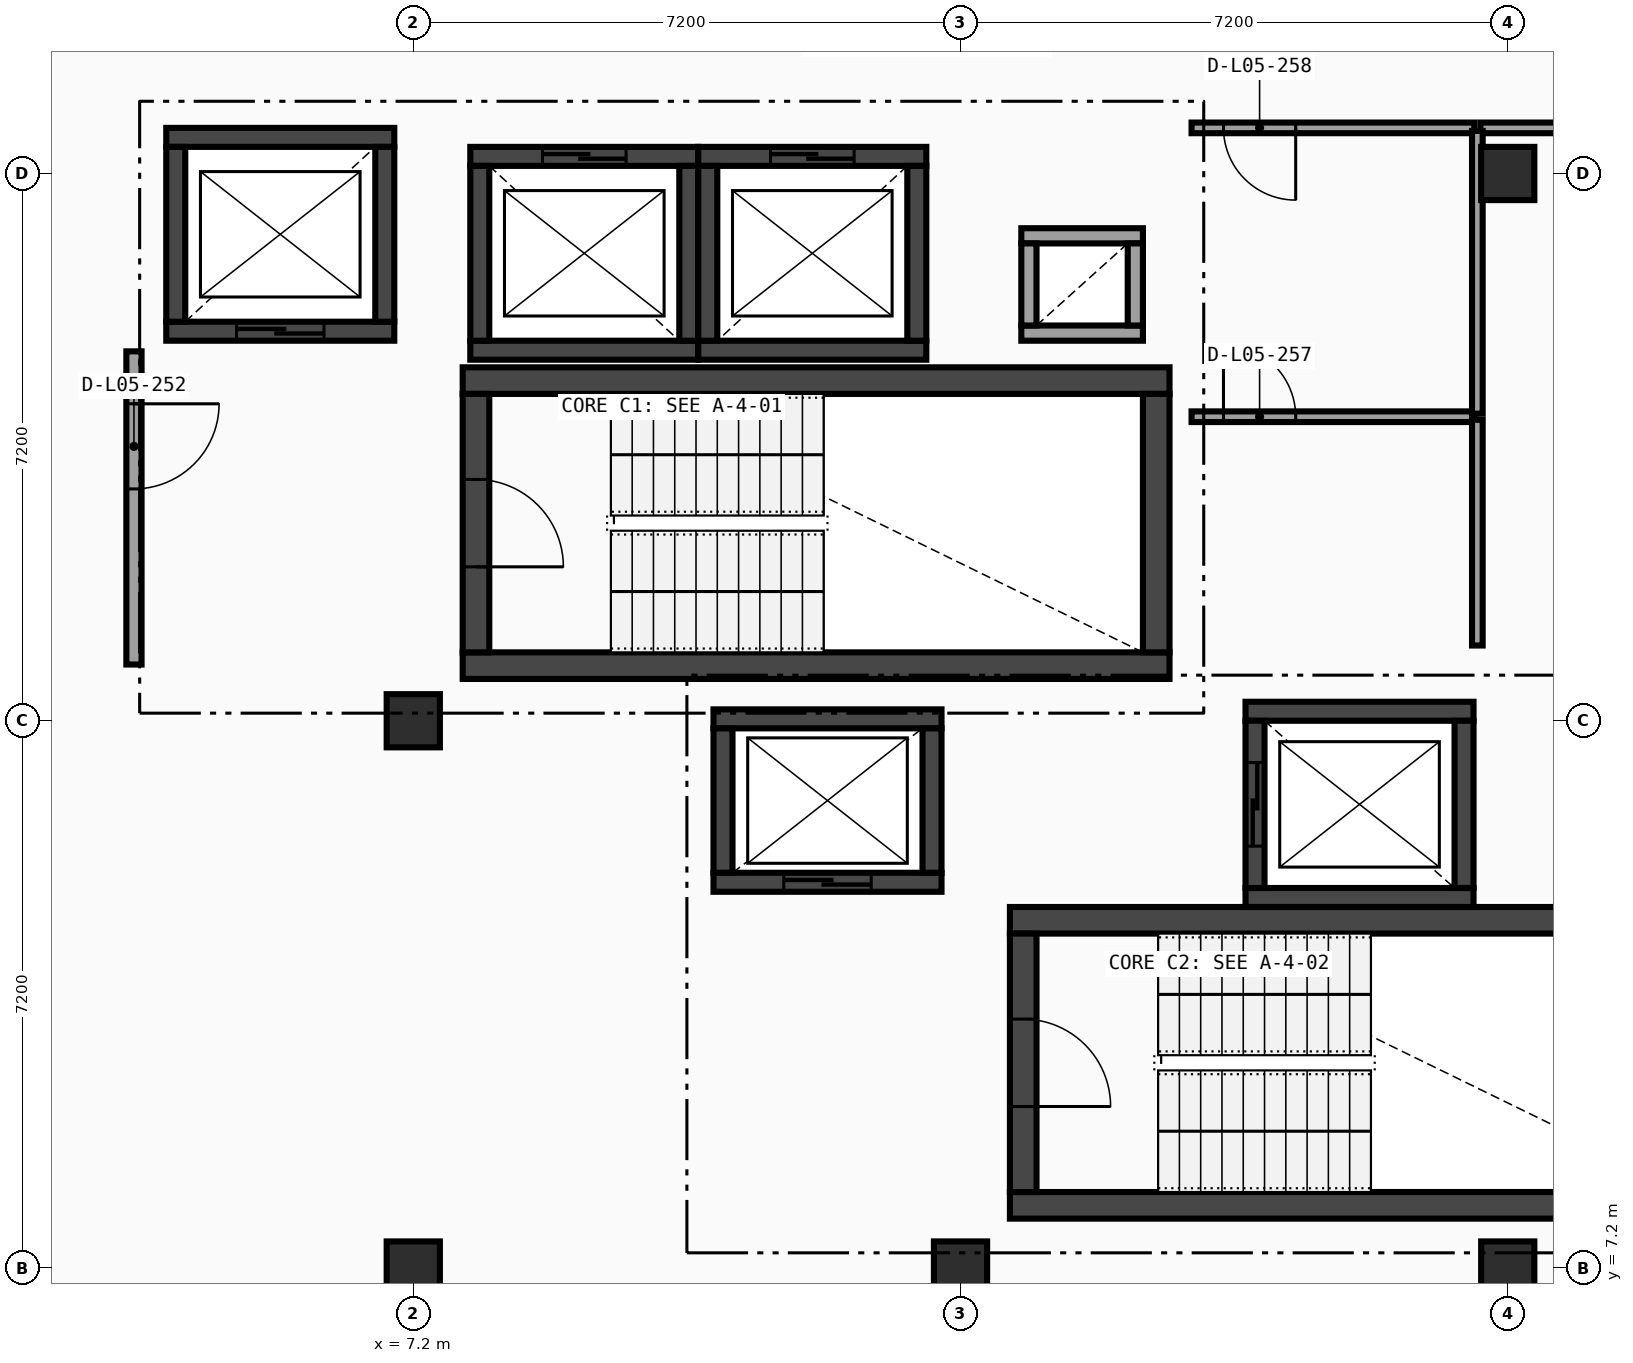
"""IFC4 building model, lengths in metres.
Left out: names, types, materials, properties, quantities, classifications, styles, units other than length and angle.
Written with IfcOpenShell. Run it as: python <this file> out.ifc"""

import sys

from ifc_helpers import new_model, si_unit, direction, frame, frame_2d, origin, origin_2d, place, context, subcontext, project, spatial, rectangle, extrude, element, fill, save


model = new_model("IFC4")
c1 = context("Model", 3, precision=1e-05, world=origin(), true_north=direction((0.0, 1.0)))
c2 = subcontext(c1, "Body", "Model", "MODEL_VIEW")
j1 = project(units=[si_unit("LENGTHUNIT", "METRE"), si_unit("PLANEANGLEUNIT", "RADIAN")], contexts=[c1])
p1 = place(None, origin())
s1 = spatial("IfcSite", under=j1, at=p1, CompositionType="ELEMENT")
p2 = place(p1, origin())
s2 = spatial("IfcBuilding", under=s1, at=p2, CompositionType="ELEMENT")
p3 = place(p2, frame((0.0, 0.0, 22.95)))
s3 = spatial("IfcBuildingStorey", under=s2, at=p3, CompositionType="ELEMENT", Elevation=22.95)
for number, where, z_axis, x_axis in (
    (1, (7.2, 7.2, 0.0), (0.0, 0.0, 1.0), (1.0, 0.0, 0.0)),
    (2, (7.2, 14.4, 0.0), (0.0, 0.0, 1.0), (1.0, 0.0, 0.0)),
    (3, (14.4, 7.2, 0.0), (0.0, 0.0, 1.0), (1.0, 0.0, 0.0)),
    (4, (21.6, 7.2, 0.0), (0.0, 0.0, 1.0), (1.0, 0.0, 0.0)),
    (5, (21.6, 21.6, 0.0), (0.0, 0.0, 1.0), (1.0, 0.0, 0.0)),
):
    element("IfcColumn", number, at=place(p3, frame(where, z_axis=z_axis, x_axis=x_axis)), inside=s3, PredefinedType="COLUMN", context=c2, shape_type="SweptSolid", body=[
        extrude(rectangle(XDim=0.7, YDim=0.7, at=origin_2d()), origin(), (0.0, 0.0, 1.0), 4.05),
    ])
for number, where, z_axis, x_axis in (
    (6, (7.85, 15.125, 0.0), (0.0, 0.0, 1.0), (1.0, 0.0, 0.0)),
    (7, (17.15, 18.875, 0.0), (0.0, 0.0, 1.0), (-1.0, 0.0, 0.0)),
):
    element("IfcWall", number, at=place(p3, frame(where, z_axis=z_axis, x_axis=x_axis)), inside=s3, PredefinedType="SHEAR", context=c2, shape_type="SweptSolid", body=[
        extrude(rectangle(XDim=9.3, YDim=0.35, at=frame_2d((4.65, 0.0))), origin(), (0.0, 0.0, 1.0), 3.8),
    ])
p4 = place(p3, frame((8.025, 18.7, 0.0), z_axis=(0.0, 0.0, 1.0), x_axis=(0.0, -1.0, 0.0)))
e8 = element("IfcWall", 8, at=p4, inside=s3, PredefinedType="SHEAR", context=c2, shape_type="SweptSolid", body=[
    extrude(rectangle(XDim=3.4, YDim=0.35, at=frame_2d((1.7, 0.0))), origin(), (0.0, 0.0, 1.0), 3.8),
])
p5 = place(p4, frame((1.125, 0.0, 0.0)))
e9 = element("IfcOpeningElement", 9, at=p5, cuts=e8, PredefinedType="OPENING", context=c2, shape_type="SweptSolid", body=[
    extrude(rectangle(XDim=1.15, YDim=2.1, at=frame_2d((0.575, 1.05))), frame((0.0, 0.185, 0.0), z_axis=(0.0, -1.0, 0.0), x_axis=(1.0, 0.0, 0.0)), (0.0, 0.0, 1.0), 0.37),
])
p6 = place(p3, frame((16.975, 15.3, 0.0), z_axis=(0.0, 0.0, 1.0), x_axis=(0.0, 1.0, 0.0)))
e10 = element("IfcWall", 10, at=p6, inside=s3, PredefinedType="SHEAR", context=c2, shape_type="SweptSolid", body=[
    extrude(rectangle(XDim=3.4, YDim=0.35, at=frame_2d((1.7, 0.0))), origin(), (0.0, 0.0, 1.0), 3.8),
])
p7 = place(p3, frame((3.95, 19.525, 0.0), z_axis=(0.0, 0.0, 1.0), x_axis=(1.0, 0.0, 0.0)))
e11 = element("IfcWall", 11, at=p7, inside=s3, PredefinedType="SHEAR", context=c2, shape_type="SweptSolid", body=[
    extrude(rectangle(XDim=3.0, YDim=0.25, at=frame_2d((1.5, 0.0))), origin(), (0.0, 0.0, 1.0), 3.8),
])
p8 = place(p7, frame((0.925, 0.0, 0.0)))
e12 = element("IfcOpeningElement", 12, at=p8, cuts=e11, PredefinedType="OPENING", context=c2, shape_type="SweptSolid", body=[
    extrude(rectangle(XDim=1.15, YDim=2.1, at=frame_2d((0.575, 1.05))), frame((0.0, 0.135, 0.0), z_axis=(0.0, -1.0, 0.0), x_axis=(1.0, 0.0, 0.0)), (0.0, 0.0, 1.0), 0.27),
])
p9 = place(p3, frame((6.95, 22.075, 0.0), z_axis=(0.0, 0.0, 1.0), x_axis=(-1.0, 0.0, 0.0)))
e13 = element("IfcWall", 13, at=p9, inside=s3, PredefinedType="SHEAR", context=c2, shape_type="SweptSolid", body=[
    extrude(rectangle(XDim=3.0, YDim=0.25, at=frame_2d((1.5, 0.0))), origin(), (0.0, 0.0, 1.0), 3.8),
])
for number, where, z_axis, x_axis in (
    (14, (4.075, 21.95, 0.0), (0.0, 0.0, 1.0), (0.0, -1.0, 0.0)),
    (15, (6.825, 19.65, 0.0), (0.0, 0.0, 1.0), (0.0, 1.0, 0.0)),
):
    element("IfcWall", number, at=place(p3, frame(where, z_axis=z_axis, x_axis=x_axis)), inside=s3, PredefinedType="SHEAR", context=c2, shape_type="SweptSolid", body=[
        extrude(rectangle(XDim=2.3, YDim=0.25, at=frame_2d((1.15, 0.0))), origin(), (0.0, 0.0, 1.0), 3.8),
    ])
p10 = place(p3, frame((7.95, 19.275, 0.0), z_axis=(0.0, 0.0, 1.0), x_axis=(1.0, 0.0, 0.0)))
e16 = element("IfcWall", 16, at=p10, inside=s3, PredefinedType="SHEAR", context=c2, shape_type="SweptSolid", body=[
    extrude(rectangle(XDim=3.0, YDim=0.25, at=frame_2d((1.5, 0.0))), origin(), (0.0, 0.0, 1.0), 3.8),
])
p11 = place(p3, frame((10.95, 21.825, 0.0), z_axis=(0.0, 0.0, 1.0), x_axis=(-1.0, 0.0, 0.0)))
e17 = element("IfcWall", 17, at=p11, inside=s3, PredefinedType="SHEAR", context=c2, shape_type="SweptSolid", body=[
    extrude(rectangle(XDim=3.0, YDim=0.25, at=frame_2d((1.5, 0.0))), origin(), (0.0, 0.0, 1.0), 3.8),
])
p12 = place(p11, frame((0.95, 0.0, 0.0)))
e18 = element("IfcOpeningElement", 18, at=p12, cuts=e17, PredefinedType="OPENING", context=c2, shape_type="SweptSolid", body=[
    extrude(rectangle(XDim=1.1, YDim=2.1, at=frame_2d((0.55, 1.05))), frame((0.0, 0.135, 0.0), z_axis=(0.0, -1.0, 0.0), x_axis=(1.0, 0.0, 0.0)), (0.0, 0.0, 1.0), 0.27),
])
for number, where, z_axis, x_axis in (
    (19, (8.075, 21.7, 0.0), (0.0, 0.0, 1.0), (0.0, -1.0, 0.0)),
    (20, (10.825, 19.4, 0.0), (0.0, 0.0, 1.0), (0.0, 1.0, 0.0)),
):
    element("IfcWall", number, at=place(p3, frame(where, z_axis=z_axis, x_axis=x_axis)), inside=s3, PredefinedType="SHEAR", context=c2, shape_type="SweptSolid", body=[
        extrude(rectangle(XDim=2.3, YDim=0.25, at=frame_2d((1.15, 0.0))), origin(), (0.0, 0.0, 1.0), 3.8),
    ])
p13 = place(p3, frame((10.95, 19.275, 0.0), z_axis=(0.0, 0.0, 1.0), x_axis=(1.0, 0.0, 0.0)))
e21 = element("IfcWall", 21, at=p13, inside=s3, PredefinedType="SHEAR", context=c2, shape_type="SweptSolid", body=[
    extrude(rectangle(XDim=3.0, YDim=0.25, at=frame_2d((1.5, 0.0))), origin(), (0.0, 0.0, 1.0), 3.8),
])
p14 = place(p3, frame((13.95, 21.825, 0.0), z_axis=(0.0, 0.0, 1.0), x_axis=(-1.0, 0.0, 0.0)))
e22 = element("IfcWall", 22, at=p14, inside=s3, PredefinedType="SHEAR", context=c2, shape_type="SweptSolid", body=[
    extrude(rectangle(XDim=3.0, YDim=0.25, at=frame_2d((1.5, 0.0))), origin(), (0.0, 0.0, 1.0), 3.8),
])
p15 = place(p14, frame((0.95, 0.0, 0.0)))
e23 = element("IfcOpeningElement", 23, at=p15, cuts=e22, PredefinedType="OPENING", context=c2, shape_type="SweptSolid", body=[
    extrude(rectangle(XDim=1.1, YDim=2.1, at=frame_2d((0.55, 1.05))), frame((0.0, 0.135, 0.0), z_axis=(0.0, -1.0, 0.0), x_axis=(1.0, 0.0, 0.0)), (0.0, 0.0, 1.0), 0.27),
])
for number, where, z_axis, x_axis in (
    (24, (11.075, 21.7, 0.0), (0.0, 0.0, 1.0), (0.0, -1.0, 0.0)),
    (25, (13.825, 19.4, 0.0), (0.0, 0.0, 1.0), (0.0, 1.0, 0.0)),
):
    element("IfcWall", number, at=place(p3, frame(where, z_axis=z_axis, x_axis=x_axis)), inside=s3, PredefinedType="SHEAR", context=c2, shape_type="SweptSolid", body=[
        extrude(rectangle(XDim=2.3, YDim=0.25, at=frame_2d((1.15, 0.0))), origin(), (0.0, 0.0, 1.0), 3.8),
    ])
for number, where, z_axis, x_axis in (
    (26, (15.05, 8.025, 0.0), (0.0, 0.0, 1.0), (1.0, 0.0, 0.0)),
    (27, (24.35, 11.775, 0.0), (0.0, 0.0, 1.0), (-1.0, 0.0, 0.0)),
):
    element("IfcWall", number, at=place(p3, frame(where, z_axis=z_axis, x_axis=x_axis)), inside=s3, PredefinedType="SHEAR", context=c2, shape_type="SweptSolid", body=[
        extrude(rectangle(XDim=9.3, YDim=0.35, at=frame_2d((4.65, 0.0))), origin(), (0.0, 0.0, 1.0), 3.8),
    ])
p16 = place(p3, frame((15.225, 11.6, 0.0), z_axis=(0.0, 0.0, 1.0), x_axis=(0.0, -1.0, 0.0)))
e28 = element("IfcWall", 28, at=p16, inside=s3, PredefinedType="SHEAR", context=c2, shape_type="SweptSolid", body=[
    extrude(rectangle(XDim=3.4, YDim=0.35, at=frame_2d((1.7, 0.0))), origin(), (0.0, 0.0, 1.0), 3.8),
])
p17 = place(p16, frame((1.125, 0.0, 0.0)))
e29 = element("IfcOpeningElement", 29, at=p17, cuts=e28, PredefinedType="OPENING", context=c2, shape_type="SweptSolid", body=[
    extrude(rectangle(XDim=1.15, YDim=2.1, at=frame_2d((0.575, 1.05))), frame((0.0, 0.185, 0.0), z_axis=(0.0, -1.0, 0.0), x_axis=(1.0, 0.0, 0.0)), (0.0, 0.0, 1.0), 0.37),
])
p18 = place(p3, frame((11.15, 12.275, 0.0), z_axis=(0.0, 0.0, 1.0), x_axis=(1.0, 0.0, 0.0)))
e30 = element("IfcWall", 30, at=p18, inside=s3, PredefinedType="SHEAR", context=c2, shape_type="SweptSolid", body=[
    extrude(rectangle(XDim=3.0, YDim=0.25, at=frame_2d((1.5, 0.0))), origin(), (0.0, 0.0, 1.0), 3.8),
])
p19 = place(p18, frame((0.925, 0.0, 0.0)))
e31 = element("IfcOpeningElement", 31, at=p19, cuts=e30, PredefinedType="OPENING", context=c2, shape_type="SweptSolid", body=[
    extrude(rectangle(XDim=1.15, YDim=2.1, at=frame_2d((0.575, 1.05))), frame((0.0, 0.135, 0.0), z_axis=(0.0, -1.0, 0.0), x_axis=(1.0, 0.0, 0.0)), (0.0, 0.0, 1.0), 0.27),
])
p20 = place(p3, frame((14.15, 14.425, 0.0), z_axis=(0.0, 0.0, 1.0), x_axis=(-1.0, 0.0, 0.0)))
e32 = element("IfcWall", 32, at=p20, inside=s3, PredefinedType="SHEAR", context=c2, shape_type="SweptSolid", body=[
    extrude(rectangle(XDim=3.0, YDim=0.25, at=frame_2d((1.5, 0.0))), origin(), (0.0, 0.0, 1.0), 3.8),
])
for number, where, z_axis, x_axis in (
    (33, (11.275, 14.3, 0.0), (0.0, 0.0, 1.0), (0.0, -1.0, 0.0)),
    (34, (14.025, 12.4, 0.0), (0.0, 0.0, 1.0), (0.0, 1.0, 0.0)),
):
    element("IfcWall", number, at=place(p3, frame(where, z_axis=z_axis, x_axis=x_axis)), inside=s3, PredefinedType="SHEAR", context=c2, shape_type="SweptSolid", body=[
        extrude(rectangle(XDim=1.9, YDim=0.25, at=frame_2d((0.95, 0.0))), origin(), (0.0, 0.0, 1.0), 3.8),
    ])
for number, where, z_axis, x_axis in (
    (35, (18.15, 12.075, 0.0), (0.0, 0.0, 1.0), (1.0, 0.0, 0.0)),
    (36, (21.15, 14.525, 0.0), (0.0, 0.0, 1.0), (-1.0, 0.0, 0.0)),
):
    element("IfcWall", number, at=place(p3, frame(where, z_axis=z_axis, x_axis=x_axis)), inside=s3, PredefinedType="SHEAR", context=c2, shape_type="SweptSolid", body=[
        extrude(rectangle(XDim=3.0, YDim=0.25, at=frame_2d((1.5, 0.0))), origin(), (0.0, 0.0, 1.0), 3.8),
    ])
p21 = place(p3, frame((18.275, 14.4, 0.0), z_axis=(0.0, 0.0, 1.0), x_axis=(0.0, -1.0, 0.0)))
e37 = element("IfcWall", 37, at=p21, inside=s3, PredefinedType="SHEAR", context=c2, shape_type="SweptSolid", body=[
    extrude(rectangle(XDim=2.2, YDim=0.25, at=frame_2d((1.1, 0.0))), origin(), (0.0, 0.0, 1.0), 3.8),
])
p22 = place(p21, frame((0.55, 0.0, 0.0)))
e38 = element("IfcOpeningElement", 38, at=p22, cuts=e37, PredefinedType="OPENING", context=c2, shape_type="SweptSolid", body=[
    extrude(rectangle(XDim=1.1, YDim=2.1, at=frame_2d((0.55, 1.05))), frame((0.0, 0.135, 0.0), z_axis=(0.0, -1.0, 0.0), x_axis=(1.0, 0.0, 0.0)), (0.0, 0.0, 1.0), 0.27),
])
p23 = place(p3, frame((21.025, 12.2, 0.0), z_axis=(0.0, 0.0, 1.0), x_axis=(0.0, 1.0, 0.0)))
e39 = element("IfcWall", 39, at=p23, inside=s3, PredefinedType="SHEAR", context=c2, shape_type="SweptSolid", body=[
    extrude(rectangle(XDim=2.2, YDim=0.25, at=frame_2d((1.1, 0.0))), origin(), (0.0, 0.0, 1.0), 3.8),
])
for number, where, z_axis, x_axis in (
    (40, (15.2, 19.5, 0.0), (0.0, 0.0, 1.0), (1.0, 0.0, 0.0)),
    (41, (16.8, 20.78, 0.0), (0.0, 0.0, 1.0), (-1.0, 0.0, 0.0)),
):
    element("IfcWall", number, at=place(p3, frame(where, z_axis=z_axis, x_axis=x_axis)), inside=s3, PredefinedType="SOLIDWALL", context=c2, shape_type="SweptSolid", body=[
        extrude(rectangle(XDim=1.6, YDim=0.2, at=frame_2d((0.8, 0.0))), origin(), (0.0, 0.0, 1.0), 3.8),
    ])
for number, where, z_axis, x_axis in (
    (42, (15.3, 20.68, 0.0), (0.0, 0.0, 1.0), (0.0, -1.0, 0.0)),
    (43, (16.7, 19.6, 0.0), (0.0, 0.0, 1.0), (0.0, 1.0, 0.0)),
):
    element("IfcWall", number, at=place(p3, frame(where, z_axis=z_axis, x_axis=x_axis)), inside=s3, PredefinedType="SOLIDWALL", context=c2, shape_type="SweptSolid", body=[
        extrude(rectangle(XDim=1.08, YDim=0.2, at=frame_2d((0.54, 0.0))), origin(), (0.0, 0.0, 1.0), 3.8),
    ])
p24 = place(p3, frame((3.525, 15.14, 0.0), z_axis=(0.0, 0.0, 1.0), x_axis=(0.0, 1.0, 0.0)))
e44 = element("IfcWall", 44, at=p24, inside=s3, PredefinedType="PARTITIONING", context=c2, shape_type="SweptSolid", body=[
    extrude(rectangle(XDim=4.12, YDim=0.2, at=frame_2d((2.06, 0.0))), origin(), (0.0, 0.0, 1.0), 3.8),
])
p25 = place(p24, frame((2.31, 0.0, 0.0)))
e45 = element("IfcOpeningElement", 45, at=p25, cuts=e44, PredefinedType="OPENING", context=c2, shape_type="SweptSolid", body=[
    extrude(rectangle(XDim=1.12, YDim=2.1, at=frame_2d((0.56, 1.05))), frame((0.0, 0.11, 0.0), z_axis=(0.0, -1.0, 0.0), x_axis=(1.0, 0.0, 0.0)), (0.0, 0.0, 1.0), 0.22),
])
p26 = place(p3, frame((17.44, 22.2, 0.0), z_axis=(0.0, 0.0, 1.0), x_axis=(1.0, 0.0, 0.0)))
e46 = element("IfcWall", 46, at=p26, inside=s3, PredefinedType="PARTITIONING", context=c2, shape_type="SweptSolid", body=[
    extrude(rectangle(XDim=3.72, YDim=0.14, at=frame_2d((1.86, 0.0))), origin(), (0.0, 0.0, 1.0), 3.8),
])
p27 = place(p26, frame((0.42, 0.0, 0.0)))
e47 = element("IfcOpeningElement", 47, at=p27, cuts=e46, PredefinedType="OPENING", context=c2, shape_type="SweptSolid", body=[
    extrude(rectangle(XDim=0.95, YDim=2.08, at=frame_2d((0.475, 1.04))), frame((0.0, 0.08, 0.0), z_axis=(0.0, -1.0, 0.0), x_axis=(1.0, 0.0, 0.0)), (0.0, 0.0, 1.0), 0.16),
])
p28 = place(p3, frame((21.24, 22.2, 0.0), z_axis=(0.0, 0.0, 1.0), x_axis=(1.0, 0.0, 0.0)))
e48 = element("IfcWall", 48, at=p28, inside=s3, PredefinedType="PARTITIONING", context=c2, shape_type="SweptSolid", body=[
    extrude(rectangle(XDim=3.12, YDim=0.14, at=frame_2d((1.56, 0.0))), origin(), (0.0, 0.0, 1.0), 3.206),
])
p29 = place(p28, frame((1.75, 0.0, 0.0)))
e49 = element("IfcOpeningElement", 49, at=p29, cuts=e48, PredefinedType="OPENING", context=c2, shape_type="SweptSolid", body=[
    extrude(rectangle(XDim=0.95, YDim=2.08, at=frame_2d((0.475, 1.04))), frame((0.0, 0.08, 0.0), z_axis=(0.0, -1.0, 0.0), x_axis=(1.0, 0.0, 0.0)), (0.0, 0.0, 1.0), 0.16),
])
p30 = place(p3, frame((17.44, 18.4, 0.0), z_axis=(0.0, 0.0, 1.0), x_axis=(1.0, 0.0, 0.0)))
e50 = element("IfcWall", 50, at=p30, inside=s3, PredefinedType="PARTITIONING", context=c2, shape_type="SweptSolid", body=[
    extrude(rectangle(XDim=3.72, YDim=0.14, at=frame_2d((1.86, 0.0))), origin(), (0.0, 0.0, 1.0), 3.8),
])
p31 = place(p30, frame((0.42, 0.0, 0.0)))
e51 = element("IfcOpeningElement", 51, at=p31, cuts=e50, PredefinedType="OPENING", context=c2, shape_type="SweptSolid", body=[
    extrude(rectangle(XDim=0.95, YDim=2.08, at=frame_2d((0.475, 1.04))), frame((0.0, 0.08, 0.0), z_axis=(0.0, -1.0, 0.0), x_axis=(1.0, 0.0, 0.0)), (0.0, 0.0, 1.0), 0.16),
])
p32 = place(p3, frame((21.2, 15.39, 0.0), z_axis=(0.0, 0.0, 1.0), x_axis=(0.0, 1.0, 0.0)))
e52 = element("IfcWall", 52, at=p32, inside=s3, PredefinedType="PARTITIONING", context=c2, shape_type="SweptSolid", body=[
    extrude(rectangle(XDim=2.97, YDim=0.14, at=frame_2d((1.485, 0.0))), origin(), (0.0, 0.0, 1.0), 3.8),
])
p33 = place(p3, frame((21.2, 18.44, 0.0), z_axis=(0.0, 0.0, 1.0), x_axis=(0.0, 1.0, 0.0)))
e53 = element("IfcWall", 53, at=p33, inside=s3, PredefinedType="PARTITIONING", context=c2, shape_type="SweptSolid", body=[
    extrude(rectangle(XDim=3.72, YDim=0.14, at=frame_2d((1.86, 0.0))), origin(), (0.0, 0.0, 1.0), 3.8),
])
p34 = place(p5, frame((1.15, 0.0, 0.0), z_axis=(0.0, 0.0, 1.0), x_axis=(-1.0, 0.0, 0.0)))
e54 = element("IfcDoor", 54, at=p34, inside=s3, OperationType="SINGLE_SWING_LEFT", PredefinedType="DOOR", context=c2, shape_type="SweptSolid", body=[
    extrude(rectangle(XDim=1.15, YDim=2.1, at=frame_2d((0.575, 1.05))), frame((0.0, 0.025, 0.0), z_axis=(0.0, -1.0, 0.0), x_axis=(1.0, 0.0, 0.0)), (0.0, 0.0, 1.0), 0.05),
])
fill(e9, e54)
p35 = place(p8, origin())
e55 = element("IfcDoor", 55, at=p35, inside=s3, OperationType="SLIDING_TO_RIGHT", PredefinedType="DOOR", context=c2, shape_type="SweptSolid", body=[
    extrude(rectangle(XDim=1.15, YDim=2.1, at=frame_2d((0.575, 1.05))), frame((0.0, 0.025, 0.0), z_axis=(0.0, -1.0, 0.0), x_axis=(1.0, 0.0, 0.0)), (0.0, 0.0, 1.0), 0.05),
])
fill(e12, e55)
p36 = place(p12, origin())
e56 = element("IfcDoor", 56, at=p36, inside=s3, OperationType="SLIDING_TO_LEFT", PredefinedType="DOOR", context=c2, shape_type="SweptSolid", body=[
    extrude(rectangle(XDim=1.1, YDim=2.1, at=frame_2d((0.55, 1.05))), frame((0.0, 0.025, 0.0), z_axis=(0.0, -1.0, 0.0), x_axis=(1.0, 0.0, 0.0)), (0.0, 0.0, 1.0), 0.05),
])
fill(e18, e56)
p37 = place(p15, origin())
e57 = element("IfcDoor", 57, at=p37, inside=s3, OperationType="SLIDING_TO_LEFT", PredefinedType="DOOR", context=c2, shape_type="SweptSolid", body=[
    extrude(rectangle(XDim=1.1, YDim=2.1, at=frame_2d((0.55, 1.05))), frame((0.0, 0.025, 0.0), z_axis=(0.0, -1.0, 0.0), x_axis=(1.0, 0.0, 0.0)), (0.0, 0.0, 1.0), 0.05),
])
fill(e23, e57)
p38 = place(p17, frame((1.15, 0.0, 0.0), z_axis=(0.0, 0.0, 1.0), x_axis=(-1.0, 0.0, 0.0)))
e58 = element("IfcDoor", 58, at=p38, inside=s3, OperationType="SINGLE_SWING_LEFT", PredefinedType="DOOR", context=c2, shape_type="SweptSolid", body=[
    extrude(rectangle(XDim=1.15, YDim=2.1, at=frame_2d((0.575, 1.05))), frame((0.0, 0.025, 0.0), z_axis=(0.0, -1.0, 0.0), x_axis=(1.0, 0.0, 0.0)), (0.0, 0.0, 1.0), 0.05),
])
fill(e29, e58)
p39 = place(p19, origin())
e59 = element("IfcDoor", 59, at=p39, inside=s3, OperationType="SLIDING_TO_RIGHT", PredefinedType="DOOR", context=c2, shape_type="SweptSolid", body=[
    extrude(rectangle(XDim=1.15, YDim=2.1, at=frame_2d((0.575, 1.05))), frame((0.0, 0.025, 0.0), z_axis=(0.0, -1.0, 0.0), x_axis=(1.0, 0.0, 0.0)), (0.0, 0.0, 1.0), 0.05),
])
fill(e31, e59)
p40 = place(p22, origin())
e60 = element("IfcDoor", 60, at=p40, inside=s3, OperationType="SLIDING_TO_LEFT", PredefinedType="DOOR", context=c2, shape_type="SweptSolid", body=[
    extrude(rectangle(XDim=1.1, YDim=2.1, at=frame_2d((0.55, 1.05))), frame((0.0, 0.025, 0.0), z_axis=(0.0, -1.0, 0.0), x_axis=(1.0, 0.0, 0.0)), (0.0, 0.0, 1.0), 0.05),
])
fill(e38, e60)
p41 = place(p25, origin())
e61 = element("IfcDoor", 61, at=p41, inside=s3, OperationType="SINGLE_SWING_RIGHT", PredefinedType="DOOR", context=c2, shape_type="SweptSolid", body=[
    extrude(rectangle(XDim=1.12, YDim=2.1, at=frame_2d((0.56, 1.05))), frame((0.0, 0.025, 0.0), z_axis=(0.0, -1.0, 0.0), x_axis=(1.0, 0.0, 0.0)), (0.0, 0.0, 1.0), 0.05),
])
fill(e45, e61)
p42 = place(p31, origin())
e62 = element("IfcDoor", 62, at=p42, inside=s3, OperationType="SINGLE_SWING_LEFT", PredefinedType="DOOR", context=c2, shape_type="SweptSolid", body=[
    extrude(rectangle(XDim=0.95, YDim=2.08, at=frame_2d((0.475, 1.04))), frame((0.0, 0.025, 0.0), z_axis=(0.0, -1.0, 0.0), x_axis=(1.0, 0.0, 0.0)), (0.0, 0.0, 1.0), 0.05),
])
fill(e51, e62)
p43 = place(p27, origin())
e63 = element("IfcDoor", 63, at=p43, inside=s3, OperationType="SINGLE_SWING_RIGHT", PredefinedType="DOOR", context=c2, shape_type="SweptSolid", body=[
    extrude(rectangle(XDim=0.95, YDim=2.08, at=frame_2d((0.475, 1.04))), frame((0.0, 0.025, 0.0), z_axis=(0.0, -1.0, 0.0), x_axis=(1.0, 0.0, 0.0)), (0.0, 0.0, 1.0), 0.05),
])
fill(e47, e63)
save(model, sys.argv[1])
